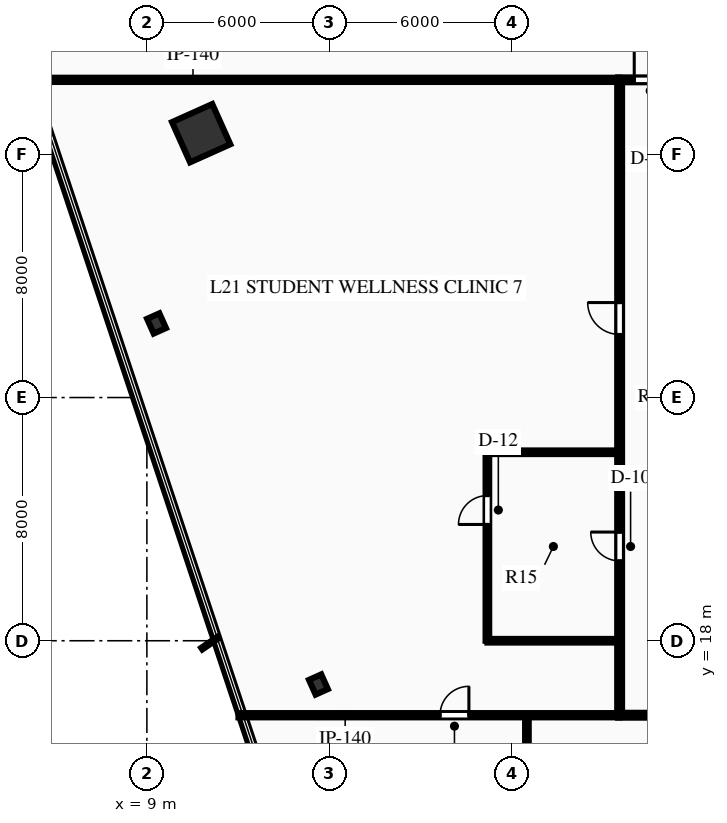
"""IFC4 building model, lengths in metres.
Left out: names, types, materials, properties, quantities, classifications, styles, units other than length and angle.
Written with IfcOpenShell. Run it as: python <this file> out.ifc"""

import sys

from ifc_helpers import new_model, si_unit, direction, frame, frame_2d, origin, origin_2d, place, context, subcontext, project, spatial, rectangle, hollow_rectangle, i_section, extrude, element, fill, save


model = new_model("IFC4")
c1 = context("Model", 3, precision=1e-05, world=origin(), true_north=direction((0.0, 1.0)))
c2 = subcontext(c1, "Body", "Model", "MODEL_VIEW")
j1 = project(units=[si_unit("LENGTHUNIT", "METRE"), si_unit("PLANEANGLEUNIT", "RADIAN")], contexts=[c1])
p1 = place(None, origin())
s1 = spatial("IfcSite", under=j1, at=p1, CompositionType="ELEMENT")
p2 = place(p1, origin())
s2 = spatial("IfcBuilding", under=s1, at=p2, CompositionType="ELEMENT")
p3 = place(p2, frame((0.0, 0.0, 90.45)))
s3 = spatial("IfcBuildingStorey", under=s2, at=p3, CompositionType="ELEMENT", Elevation=90.45)
p4 = place(p3, frame((10.786, 34.695, 0.0), z_axis=(0.0, 0.0, 1.0), x_axis=(0.912477494148, 0.409126902895, 0.0)))
e1 = element("IfcColumn", 1, at=p4, inside=s3, PredefinedType="COLUMN", context=c2, shape_type="SweptSolid", body=[
    extrude(hollow_rectangle(XDim=1.45, YDim=1.45, WallThickness=0.07, at=origin_2d()), origin(), (0.0, 0.0, 1.0), 3.75),
])
for number, where, z_axis, x_axis in (
    (2, (9.318, 28.437, 0.0), (0.0, 0.0, 1.0), (0.912, 0.409, 0.0)),
    (3, (14.643, 16.561, 0.0), (0.0, 0.0, 1.0), (0.912, 0.409, 0.0)),
):
    element("IfcColumn", number, at=place(p3, frame(where, z_axis=z_axis, x_axis=x_axis)), inside=s3, PredefinedType="COLUMN", context=c2, shape_type="SweptSolid", body=[
        extrude(i_section(OverallWidth=0.442, OverallDepth=0.531, WebThickness=0.066, FlangeThickness=0.106, at=origin_2d()), origin(), (0.0, 0.0, 1.0), 3.75),
    ])
p5 = place(p3, frame((4.669, 37.498, 0.0), z_axis=(0.0, 0.0, 1.0), x_axis=(0.948891508719, 0.315602447205, 0.0)))
e4 = element("IfcWall", 4, at=p5, inside=s3, PredefinedType="STANDARD", context=c2, shape_type="SweptSolid", body=[
    extrude(rectangle(XDim=4.1, YDim=0.32, at=frame_2d((2.05, 0.0))), origin(), (0.0, 0.0, 1.0), 3.45),
])
p6 = place(p5, frame((1.3, 0.0, 0.85)))
e5 = element("IfcOpeningElement", 5, at=p6, cuts=e4, PredefinedType="OPENING", context=c2, shape_type="SweptSolid", body=[
    extrude(rectangle(XDim=1.5, YDim=2.1, at=frame_2d((0.75, 1.05))), frame((0.0, 0.17, 0.0), z_axis=(0.0, -1.0, 0.0), x_axis=(1.0, 0.0, 0.0)), (0.0, 0.0, 1.0), 0.34),
])
p7 = place(p3, frame((24.5, 15.55, 0.0), z_axis=(0.0, 0.0, 1.0), x_axis=(1.0, 0.0, 0.0)))
e6 = element("IfcWall", 6, at=p7, inside=s3, PredefinedType="PARTITIONING", context=c2, shape_type="SweptSolid", body=[
    extrude(rectangle(XDim=23.0, YDim=0.16, at=frame_2d((11.5, 0.0))), origin(), (0.0, 0.0, 1.0), 3.45),
])
p8 = place(p7, frame((16.15, 0.0, 0.0)))
e7 = element("IfcOpeningElement", 7, at=p8, cuts=e6, PredefinedType="OPENING", context=c2, shape_type="SweptSolid", body=[
    extrude(rectangle(XDim=0.9, YDim=2.15, at=frame_2d((0.45, 1.075))), frame((0.0, 0.09, 0.0), z_axis=(0.0, -1.0, 0.0), x_axis=(1.0, 0.0, 0.0)), (0.0, 0.0, 1.0), 0.18),
])
p9 = place(p7, frame((18.45, 0.0, 0.0)))
e8 = element("IfcOpeningElement", 8, at=p9, cuts=e6, PredefinedType="OPENING", context=c2, shape_type="SweptSolid", body=[
    extrude(rectangle(XDim=0.9, YDim=2.15, at=frame_2d((0.45, 1.075))), frame((0.0, 0.09, 0.0), z_axis=(0.0, -1.0, 0.0), x_axis=(1.0, 0.0, 0.0)), (0.0, 0.0, 1.0), 0.18),
])
p10 = place(p7, frame((20.7, 0.0, 0.0)))
e9 = element("IfcOpeningElement", 9, at=p10, cuts=e6, PredefinedType="OPENING", context=c2, shape_type="SweptSolid", body=[
    extrude(rectangle(XDim=1.0, YDim=2.15, at=frame_2d((0.5, 1.075))), frame((0.0, 0.09, 0.0), z_axis=(0.0, -1.0, 0.0), x_axis=(1.0, 0.0, 0.0)), (0.0, 0.0, 1.0), 0.18),
])
p11 = place(p7, frame((3.781, 0.0, 0.0)))
e10 = element("IfcOpeningElement", 10, at=p11, cuts=e6, PredefinedType="OPENING", context=c2, shape_type="SweptSolid", body=[
    extrude(rectangle(XDim=1.05, YDim=2.15, at=frame_2d((0.525, 1.075))), frame((0.0, 0.09, 0.0), z_axis=(0.0, -1.0, 0.0), x_axis=(1.0, 0.0, 0.0)), (0.0, 0.0, 1.0), 0.18),
])
p12 = place(p7, frame((8.373, 0.0, 0.0)))
e11 = element("IfcOpeningElement", 11, at=p12, cuts=e6, PredefinedType="OPENING", context=c2, shape_type="SweptSolid", body=[
    extrude(rectangle(XDim=1.05, YDim=2.15, at=frame_2d((0.525, 1.075))), frame((0.0, 0.09, 0.0), z_axis=(0.0, -1.0, 0.0), x_axis=(1.0, 0.0, 0.0)), (0.0, 0.0, 1.0), 0.18),
])
p13 = place(p3, frame((24.5, 36.45, 0.0), z_axis=(0.0, 0.0, 1.0), x_axis=(1.0, 0.0, 0.0)))
e12 = element("IfcWall", 12, at=p13, inside=s3, PredefinedType="PARTITIONING", context=c2, shape_type="SweptSolid", body=[
    extrude(rectangle(XDim=23.0, YDim=0.16, at=frame_2d((11.5, 0.0))), origin(), (0.0, 0.0, 1.0), 3.45),
])
p14 = place(p13, frame((0.53, 0.0, 0.0)))
e13 = element("IfcOpeningElement", 13, at=p14, cuts=e12, PredefinedType="OPENING", context=c2, shape_type="SweptSolid", body=[
    extrude(rectangle(XDim=1.05, YDim=2.15, at=frame_2d((0.525, 1.075))), frame((0.0, 0.09, 0.0), z_axis=(0.0, -1.0, 0.0), x_axis=(1.0, 0.0, 0.0)), (0.0, 0.0, 1.0), 0.18),
])
p15 = place(p13, frame((9.755, 0.0, 0.0)))
e14 = element("IfcOpeningElement", 14, at=p15, cuts=e12, PredefinedType="OPENING", context=c2, shape_type="SweptSolid", body=[
    extrude(rectangle(XDim=1.05, YDim=2.15, at=frame_2d((0.525, 1.075))), frame((0.0, 0.09, 0.0), z_axis=(0.0, -1.0, 0.0), x_axis=(1.0, 0.0, 0.0)), (0.0, 0.0, 1.0), 0.18),
])
p16 = place(p13, frame((16.129, 0.0, 0.0)))
e15 = element("IfcOpeningElement", 15, at=p16, cuts=e12, PredefinedType="OPENING", context=c2, shape_type="SweptSolid", body=[
    extrude(rectangle(XDim=1.05, YDim=2.15, at=frame_2d((0.525, 1.075))), frame((0.0, 0.09, 0.0), z_axis=(0.0, -1.0, 0.0), x_axis=(1.0, 0.0, 0.0)), (0.0, 0.0, 1.0), 0.18),
])
p17 = place(p3, frame((24.55, 15.55, 0.0), z_axis=(0.0, 0.0, 1.0), x_axis=(0.0, 1.0, 0.0)))
e16 = element("IfcWall", 16, at=p17, inside=s3, PredefinedType="PARTITIONING", context=c2, shape_type="SweptSolid", body=[
    extrude(rectangle(XDim=20.9, YDim=0.16, at=frame_2d((10.45, 0.0))), origin(), (0.0, 0.0, 1.0), 3.45),
])
p18 = place(p17, frame((5.075, 0.0, 0.0)))
e17 = element("IfcOpeningElement", 17, at=p18, cuts=e16, PredefinedType="OPENING", context=c2, shape_type="SweptSolid", body=[
    extrude(rectangle(XDim=0.95, YDim=2.15, at=frame_2d((0.475, 1.075))), frame((0.0, 0.09, 0.0), z_axis=(0.0, -1.0, 0.0), x_axis=(1.0, 0.0, 0.0)), (0.0, 0.0, 1.0), 0.18),
])
p19 = place(p17, frame((12.524, 0.0, 0.0)))
e18 = element("IfcOpeningElement", 18, at=p19, cuts=e16, PredefinedType="OPENING", context=c2, shape_type="SweptSolid", body=[
    extrude(rectangle(XDim=1.05, YDim=2.15, at=frame_2d((0.525, 1.075))), frame((0.0, 0.09, 0.0), z_axis=(0.0, -1.0, 0.0), x_axis=(1.0, 0.0, 0.0)), (0.0, 0.0, 1.0), 0.18),
])
p20 = place(p3, frame((12.012, 15.55, 0.0), z_axis=(0.0, 0.0, 1.0), x_axis=(1.0, 0.0, 0.0)))
e19 = element("IfcWall", 19, at=p20, inside=s3, PredefinedType="PARTITIONING", context=c2, shape_type="SweptSolid", body=[
    extrude(rectangle(XDim=12.538, YDim=0.14, at=frame_2d((6.269, 0.0))), origin(), (0.0, 0.0, 1.0), 3.45),
])
p21 = place(p20, frame((6.63, 0.0, 0.0)))
e20 = element("IfcOpeningElement", 20, at=p21, cuts=e19, PredefinedType="OPENING", context=c2, shape_type="SweptSolid", body=[
    extrude(rectangle(XDim=0.95, YDim=2.15, at=frame_2d((0.475, 1.075))), frame((0.0, 0.08, 0.0), z_axis=(0.0, -1.0, 0.0), x_axis=(1.0, 0.0, 0.0)), (0.0, 0.0, 1.0), 0.16),
])
p22 = place(p3, frame((5.06, 36.45, 0.0), z_axis=(0.0, 0.0, 1.0), x_axis=(1.0, 0.0, 0.0)))
e21 = element("IfcWall", 21, at=p22, inside=s3, PredefinedType="PARTITIONING", context=c2, shape_type="SweptSolid", body=[
    extrude(rectangle(XDim=19.49, YDim=0.14, at=frame_2d((9.745, 0.0))), origin(), (0.0, 0.0, 1.0), 3.45),
])
p23 = place(p3, frame((21.5, -0.281, 0.0), z_axis=(0.0, 0.0, 1.0), x_axis=(0.0, 1.0, 0.0)))
e22 = element("IfcWall", 22, at=p23, inside=s3, PredefinedType="PARTITIONING", context=c2, shape_type="SweptSolid", body=[
    extrude(rectangle(XDim=15.831, YDim=0.12, at=frame_2d((7.915, 0.0))), origin(), (0.0, 0.0, 1.0), 3.45),
])
p24 = place(p3, frame((20.2, 18.0, 0.0), z_axis=(0.0, 0.0, 1.0), x_axis=(1.0, 0.0, 0.0)))
e23 = element("IfcWall", 23, at=p24, inside=s3, PredefinedType="PARTITIONING", context=c2, shape_type="SweptSolid", body=[
    extrude(rectangle(XDim=4.35, YDim=0.12, at=frame_2d((2.175, 0.0))), origin(), (0.0, 0.0, 1.0), 2.749),
])
p25 = place(p3, frame((20.2, 18.0, 0.0), z_axis=(0.0, 0.0, 1.0), x_axis=(0.0, 1.0, 0.0)))
e24 = element("IfcWall", 24, at=p25, inside=s3, PredefinedType="PARTITIONING", context=c2, shape_type="SweptSolid", body=[
    extrude(rectangle(XDim=6.2, YDim=0.12, at=frame_2d((3.1, 0.0))), origin(), (0.0, 0.0, 1.0), 3.45),
])
p26 = place(p25, frame((3.825, 0.0, 0.0)))
e25 = element("IfcOpeningElement", 25, at=p26, cuts=e24, PredefinedType="OPENING", context=c2, shape_type="SweptSolid", body=[
    extrude(rectangle(XDim=0.95, YDim=2.15, at=frame_2d((0.475, 1.075))), frame((0.0, 0.07, 0.0), z_axis=(0.0, -1.0, 0.0), x_axis=(1.0, 0.0, 0.0)), (0.0, 0.0, 1.0), 0.14),
])
p27 = place(p3, frame((20.2, 24.2, 0.0), z_axis=(0.0, 0.0, 1.0), x_axis=(1.0, 0.0, 0.0)))
e26 = element("IfcWall", 26, at=p27, inside=s3, PredefinedType="PARTITIONING", context=c2, shape_type="SweptSolid", body=[
    extrude(rectangle(XDim=4.35, YDim=0.12, at=frame_2d((2.175, 0.0))), origin(), (0.0, 0.0, 1.0), 3.45),
])
p28 = place(p18, origin())
e27 = element("IfcDoor", 27, at=p28, inside=s3, OperationType="SINGLE_SWING_RIGHT", PredefinedType="DOOR", context=c2, shape_type="SweptSolid", body=[
    extrude(rectangle(XDim=0.95, YDim=2.15, at=frame_2d((0.475, 1.075))), frame((0.0, 0.025, 0.0), z_axis=(0.0, -1.0, 0.0), x_axis=(1.0, 0.0, 0.0)), (0.0, 0.0, 1.0), 0.05),
])
fill(e17, e27)
p29 = place(p26, origin())
e28 = element("IfcDoor", 28, at=p29, inside=s3, OperationType="SINGLE_SWING_LEFT", PredefinedType="DOOR", context=c2, shape_type="SweptSolid", body=[
    extrude(rectangle(XDim=0.95, YDim=2.15, at=frame_2d((0.475, 1.075))), frame((0.0, 0.025, 0.0), z_axis=(0.0, -1.0, 0.0), x_axis=(1.0, 0.0, 0.0)), (0.0, 0.0, 1.0), 0.05),
])
fill(e25, e28)
p30 = place(p21, origin())
e29 = element("IfcDoor", 29, at=p30, inside=s3, OperationType="SINGLE_SWING_RIGHT", PredefinedType="DOOR", context=c2, shape_type="SweptSolid", body=[
    extrude(rectangle(XDim=0.95, YDim=2.15, at=frame_2d((0.475, 1.075))), frame((0.0, 0.025, 0.0), z_axis=(0.0, -1.0, 0.0), x_axis=(1.0, 0.0, 0.0)), (0.0, 0.0, 1.0), 0.05),
])
fill(e20, e29)
p31 = place(p14, origin())
e30 = element("IfcDoor", 30, at=p31, inside=s3, OperationType="SINGLE_SWING_LEFT", PredefinedType="DOOR", context=c2, shape_type="SweptSolid", body=[
    extrude(rectangle(XDim=1.05, YDim=2.15, at=frame_2d((0.525, 1.075))), frame((0.0, 0.025, 0.0), z_axis=(0.0, -1.0, 0.0), x_axis=(1.0, 0.0, 0.0)), (0.0, 0.0, 1.0), 0.05),
])
fill(e13, e30)
p32 = place(p19, origin())
e31 = element("IfcDoor", 31, at=p32, inside=s3, OperationType="SINGLE_SWING_RIGHT", PredefinedType="DOOR", context=c2, shape_type="SweptSolid", body=[
    extrude(rectangle(XDim=1.05, YDim=2.15, at=frame_2d((0.525, 1.075))), frame((0.0, 0.025, 0.0), z_axis=(0.0, -1.0, 0.0), x_axis=(1.0, 0.0, 0.0)), (0.0, 0.0, 1.0), 0.05),
])
fill(e18, e31)
save(model, sys.argv[1])
